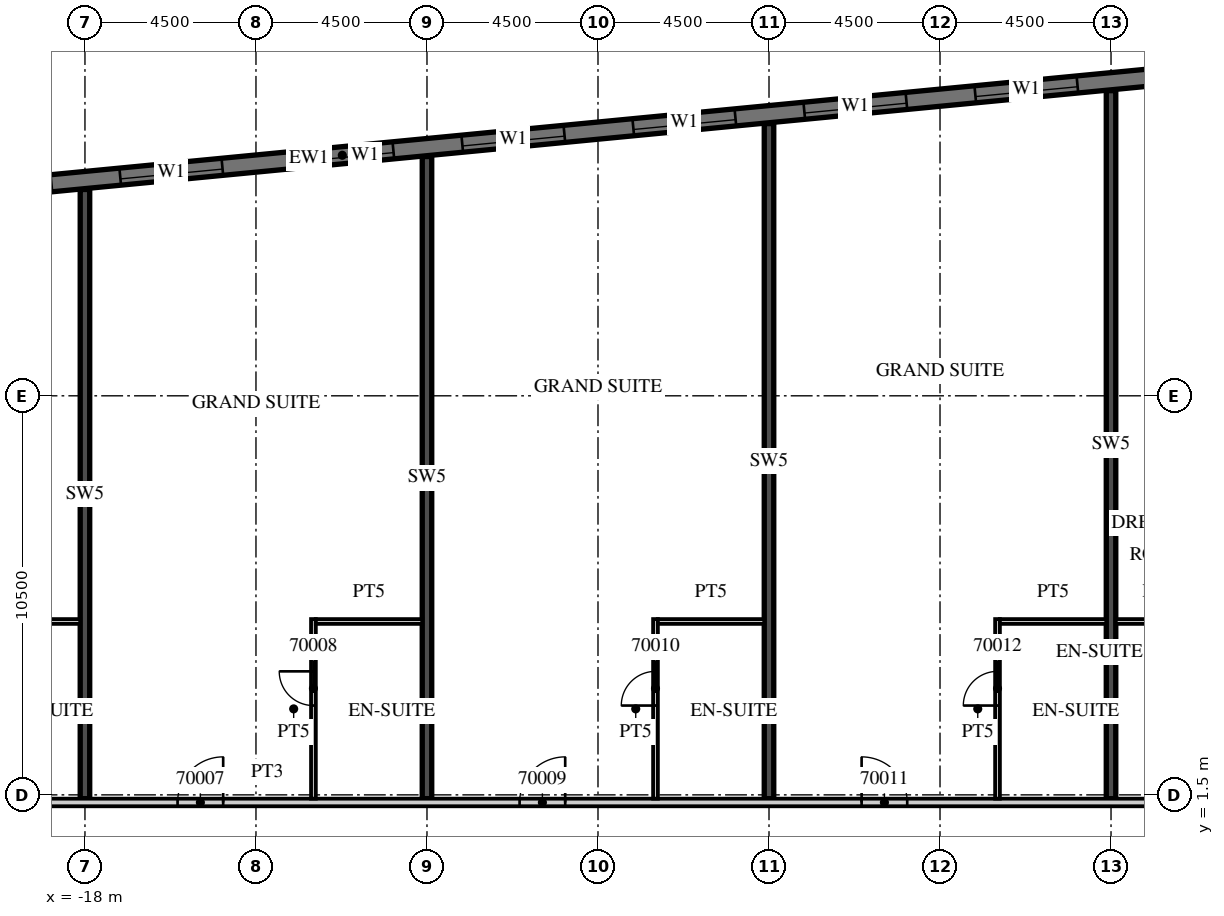
"""IFC4 building model, lengths in metres.
Left out: names, types, materials, properties, quantities, classifications, styles, units other than length and angle.
Written with IfcOpenShell. Run it as: python <this file> out.ifc"""

import sys

from ifc_helpers import new_model, si_unit, direction, frame, frame_2d, origin, place, context, subcontext, project, spatial, rectangle, extrude, element, fill, save


model = new_model("IFC4")
c1 = context("Model", 3, precision=1e-05, world=origin(), true_north=direction((0.0, 1.0)))
c2 = subcontext(c1, "Body", "Model", "MODEL_VIEW")
j1 = project(units=[si_unit("LENGTHUNIT", "METRE"), si_unit("PLANEANGLEUNIT", "RADIAN")], contexts=[c1])
p1 = place(None, origin())
s1 = spatial("IfcSite", under=j1, at=p1, CompositionType="ELEMENT")
p2 = place(p1, origin())
s2 = spatial("IfcBuilding", under=s1, at=p2, CompositionType="ELEMENT")
p3 = place(p2, frame((0.0, 0.0, 281.7)))
s3 = spatial("IfcBuildingStorey", under=s2, at=p3, CompositionType="ELEMENT", Elevation=281.7)
p4 = place(p3, frame((-18.0, 1.4, 0.0), z_axis=(0.0, 0.0, 1.0), x_axis=(0.0, 1.0, 0.0)))
e1 = element("IfcWall", 1, at=p4, inside=s3, PredefinedType="SHEAR", context=c2, shape_type="SweptSolid", body=[
    extrude(rectangle(XDim=16.03, YDim=0.25, at=frame_2d((8.015, 0.0))), origin(), (0.0, 0.0, 1.0), 3.3),
])
p5 = place(p3, frame((-9.0, 1.4, 0.0), z_axis=(0.0, 0.0, 1.0), x_axis=(0.0, 1.0, 0.0)))
e2 = element("IfcWall", 2, at=p5, inside=s3, PredefinedType="SHEAR", context=c2, shape_type="SweptSolid", body=[
    extrude(rectangle(XDim=16.896, YDim=0.25, at=frame_2d((8.448, 0.0))), origin(), (0.0, 0.0, 1.0), 3.3),
])
p6 = place(p3, frame((0.0, 1.4, 0.0), z_axis=(0.0, 0.0, 1.0), x_axis=(0.0, 1.0, 0.0)))
e3 = element("IfcWall", 3, at=p6, inside=s3, PredefinedType="SHEAR", context=c2, shape_type="SweptSolid", body=[
    extrude(rectangle(XDim=17.763, YDim=0.25, at=frame_2d((8.881, 0.0))), origin(), (0.0, 0.0, 1.0), 3.3),
])
p7 = place(p3, frame((9.0, 1.4, 0.0), z_axis=(0.0, 0.0, 1.0), x_axis=(0.0, 1.0, 0.0)))
e4 = element("IfcWall", 4, at=p7, inside=s3, PredefinedType="SHEAR", context=c2, shape_type="SweptSolid", body=[
    extrude(rectangle(XDim=18.629, YDim=0.25, at=frame_2d((9.315, 0.0))), origin(), (0.0, 0.0, 1.0), 3.3),
])
p8 = place(p3, frame((13.521, 20.713, 0.0), z_axis=(0.0, 0.0, 1.0), x_axis=(-0.995396277313, -0.095844932638, 0.0)))
e5 = element("IfcWall", 5, at=p8, inside=s3, PredefinedType="SOLIDWALL", context=c2, shape_type="SweptSolid", body=[
    extrude(rectangle(XDim=51.495, YDim=0.45, at=frame_2d((25.748, 0.0))), origin(), (0.0, 0.0, 1.0), 3.02),
])
p9 = place(p8, frame((0.91, 0.0, 0.45)))
e6 = element("IfcOpeningElement", 6, at=p9, cuts=e5, PredefinedType="OPENING", context=c2, shape_type="SweptSolid", body=[
    extrude(rectangle(XDim=2.7, YDim=2.25, at=frame_2d((1.35, 1.125))), frame((0.0, 0.235, 0.0), z_axis=(0.0, -1.0, 0.0), x_axis=(1.0, 0.0, 0.0)), (0.0, 0.0, 1.0), 0.47),
])
p10 = place(p8, frame((5.431, 0.0, 0.45)))
e7 = element("IfcOpeningElement", 7, at=p10, cuts=e5, PredefinedType="OPENING", context=c2, shape_type="SweptSolid", body=[
    extrude(rectangle(XDim=2.7, YDim=2.25, at=frame_2d((1.35, 1.125))), frame((0.0, 0.235, 0.0), z_axis=(0.0, -1.0, 0.0), x_axis=(1.0, 0.0, 0.0)), (0.0, 0.0, 1.0), 0.47),
])
p11 = place(p8, frame((9.952, 0.0, 0.45)))
e8 = element("IfcOpeningElement", 8, at=p11, cuts=e5, PredefinedType="OPENING", context=c2, shape_type="SweptSolid", body=[
    extrude(rectangle(XDim=2.7, YDim=2.25, at=frame_2d((1.35, 1.125))), frame((0.0, 0.235, 0.0), z_axis=(0.0, -1.0, 0.0), x_axis=(1.0, 0.0, 0.0)), (0.0, 0.0, 1.0), 0.47),
])
p12 = place(p8, frame((14.473, 0.0, 0.45)))
e9 = element("IfcOpeningElement", 9, at=p12, cuts=e5, PredefinedType="OPENING", context=c2, shape_type="SweptSolid", body=[
    extrude(rectangle(XDim=2.7, YDim=2.25, at=frame_2d((1.35, 1.125))), frame((0.0, 0.235, 0.0), z_axis=(0.0, -1.0, 0.0), x_axis=(1.0, 0.0, 0.0)), (0.0, 0.0, 1.0), 0.47),
])
p13 = place(p8, frame((18.994, 0.0, 0.45)))
e10 = element("IfcOpeningElement", 10, at=p13, cuts=e5, PredefinedType="OPENING", context=c2, shape_type="SweptSolid", body=[
    extrude(rectangle(XDim=2.7, YDim=2.25, at=frame_2d((1.35, 1.125))), frame((0.0, 0.235, 0.0), z_axis=(0.0, -1.0, 0.0), x_axis=(1.0, 0.0, 0.0)), (0.0, 0.0, 1.0), 0.47),
])
p14 = place(p8, frame((23.514, 0.0, 0.45)))
e11 = element("IfcOpeningElement", 11, at=p14, cuts=e5, PredefinedType="OPENING", context=c2, shape_type="SweptSolid", body=[
    extrude(rectangle(XDim=2.7, YDim=2.25, at=frame_2d((1.35, 1.125))), frame((0.0, 0.235, 0.0), z_axis=(0.0, -1.0, 0.0), x_axis=(1.0, 0.0, 0.0)), (0.0, 0.0, 1.0), 0.47),
])
p15 = place(p8, frame((28.035, 0.0, 0.45)))
e12 = element("IfcOpeningElement", 12, at=p15, cuts=e5, PredefinedType="OPENING", context=c2, shape_type="SweptSolid", body=[
    extrude(rectangle(XDim=2.7, YDim=2.25, at=frame_2d((1.35, 1.125))), frame((0.0, 0.235, 0.0), z_axis=(0.0, -1.0, 0.0), x_axis=(1.0, 0.0, 0.0)), (0.0, 0.0, 1.0), 0.47),
])
p16 = place(p8, frame((32.556, 0.0, 0.45)))
e13 = element("IfcOpeningElement", 13, at=p16, cuts=e5, PredefinedType="OPENING", context=c2, shape_type="SweptSolid", body=[
    extrude(rectangle(XDim=2.7, YDim=2.25, at=frame_2d((1.35, 1.125))), frame((0.0, 0.235, 0.0), z_axis=(0.0, -1.0, 0.0), x_axis=(1.0, 0.0, 0.0)), (0.0, 0.0, 1.0), 0.47),
])
p17 = place(p8, frame((37.077, 0.0, 0.45)))
e14 = element("IfcOpeningElement", 14, at=p17, cuts=e5, PredefinedType="OPENING", context=c2, shape_type="SweptSolid", body=[
    extrude(rectangle(XDim=2.7, YDim=2.25, at=frame_2d((1.35, 1.125))), frame((0.0, 0.235, 0.0), z_axis=(0.0, -1.0, 0.0), x_axis=(1.0, 0.0, 0.0)), (0.0, 0.0, 1.0), 0.47),
])
p18 = place(p8, frame((41.598, 0.0, 0.45)))
e15 = element("IfcOpeningElement", 15, at=p18, cuts=e5, PredefinedType="OPENING", context=c2, shape_type="SweptSolid", body=[
    extrude(rectangle(XDim=2.7, YDim=2.25, at=frame_2d((1.35, 1.125))), frame((0.0, 0.235, 0.0), z_axis=(0.0, -1.0, 0.0), x_axis=(1.0, 0.0, 0.0)), (0.0, 0.0, 1.0), 0.47),
])
p19 = place(p8, frame((46.118, 0.0, 0.45)))
e16 = element("IfcOpeningElement", 16, at=p19, cuts=e5, PredefinedType="OPENING", context=c2, shape_type="SweptSolid", body=[
    extrude(rectangle(XDim=2.7, YDim=2.25, at=frame_2d((1.35, 1.125))), frame((0.0, 0.235, 0.0), z_axis=(0.0, -1.0, 0.0), x_axis=(1.0, 0.0, 0.0)), (0.0, 0.0, 1.0), 0.47),
])
p20 = place(p3, frame((-39.909, 1.3, 0.0), z_axis=(0.0, 0.0, 1.0), x_axis=(1.0, 0.0, 0.0)))
e17 = element("IfcWall", 17, at=p20, inside=s3, PredefinedType="PARTITIONING", context=c2, shape_type="SweptSolid", body=[
    extrude(rectangle(XDim=53.409, YDim=0.2, at=frame_2d((26.705, 0.0))), origin(), (0.0, 0.0, 1.0), 3.02),
])
p21 = place(p20, frame((0.15, 0.0, 0.0)))
e18 = element("IfcOpeningElement", 18, at=p21, cuts=e17, PredefinedType="OPENING", context=c2, shape_type="SweptSolid", body=[
    extrude(rectangle(XDim=0.9, YDim=2.1, at=frame_2d((0.45, 1.05))), frame((0.0, 0.11, 0.0), z_axis=(0.0, -1.0, 0.0), x_axis=(1.0, 0.0, 0.0)), (0.0, 0.0, 1.0), 0.22),
])
p22 = place(p20, frame((6.347, 0.0, 0.0)))
e19 = element("IfcOpeningElement", 19, at=p22, cuts=e17, PredefinedType="OPENING", context=c2, shape_type="SweptSolid", body=[
    extrude(rectangle(XDim=1.2, YDim=2.1, at=frame_2d((0.6, 1.05))), frame((0.0, 0.11, 0.0), z_axis=(0.0, -1.0, 0.0), x_axis=(1.0, 0.0, 0.0)), (0.0, 0.0, 1.0), 0.22),
])
p23 = place(p20, frame((15.347, 0.0, 0.0)))
e20 = element("IfcOpeningElement", 20, at=p23, cuts=e17, PredefinedType="OPENING", context=c2, shape_type="SweptSolid", body=[
    extrude(rectangle(XDim=1.2, YDim=2.1, at=frame_2d((0.6, 1.05))), frame((0.0, 0.11, 0.0), z_axis=(0.0, -1.0, 0.0), x_axis=(1.0, 0.0, 0.0)), (0.0, 0.0, 1.0), 0.22),
])
p24 = place(p20, frame((24.346, 0.0, 0.0)))
e21 = element("IfcOpeningElement", 21, at=p24, cuts=e17, PredefinedType="OPENING", context=c2, shape_type="SweptSolid", body=[
    extrude(rectangle(XDim=1.2, YDim=2.1, at=frame_2d((0.6, 1.05))), frame((0.0, 0.11, 0.0), z_axis=(0.0, -1.0, 0.0), x_axis=(1.0, 0.0, 0.0)), (0.0, 0.0, 1.0), 0.22),
])
p25 = place(p20, frame((33.346, 0.0, 0.0)))
e22 = element("IfcOpeningElement", 22, at=p25, cuts=e17, PredefinedType="OPENING", context=c2, shape_type="SweptSolid", body=[
    extrude(rectangle(XDim=1.2, YDim=2.1, at=frame_2d((0.6, 1.05))), frame((0.0, 0.11, 0.0), z_axis=(0.0, -1.0, 0.0), x_axis=(1.0, 0.0, 0.0)), (0.0, 0.0, 1.0), 0.22),
])
p26 = place(p20, frame((42.346, 0.0, 0.0)))
e23 = element("IfcOpeningElement", 23, at=p26, cuts=e17, PredefinedType="OPENING", context=c2, shape_type="SweptSolid", body=[
    extrude(rectangle(XDim=1.2, YDim=2.1, at=frame_2d((0.6, 1.05))), frame((0.0, 0.11, 0.0), z_axis=(0.0, -1.0, 0.0), x_axis=(1.0, 0.0, 0.0)), (0.0, 0.0, 1.0), 0.22),
])
p27 = place(p20, frame((51.834, 0.0, 0.0)))
e24 = element("IfcOpeningElement", 24, at=p27, cuts=e17, PredefinedType="OPENING", context=c2, shape_type="SweptSolid", body=[
    extrude(rectangle(XDim=1.0, YDim=2.1, at=frame_2d((0.5, 1.05))), frame((0.0, 0.11, 0.0), z_axis=(0.0, -1.0, 0.0), x_axis=(1.0, 0.0, 0.0)), (0.0, 0.0, 1.0), 0.22),
])
p28 = place(p3, frame((-20.925, 6.062, 0.0), z_axis=(0.0, 0.0, 1.0), x_axis=(1.0, 0.0, 0.0)))
e25 = element("IfcWall", 25, at=p28, inside=s3, PredefinedType="PARTITIONING", context=c2, shape_type="SweptSolid", body=[
    extrude(rectangle(XDim=2.8, YDim=0.125, at=frame_2d((1.4, 0.0))), origin(), (0.0, 0.0, 1.0), 3.02),
])
p29 = place(p3, frame((-11.988, 1.4, 0.0), z_axis=(0.0, 0.0, 1.0), x_axis=(0.0, 1.0, 0.0)))
e26 = element("IfcWall", 26, at=p29, inside=s3, PredefinedType="PARTITIONING", context=c2, shape_type="SweptSolid", body=[
    extrude(rectangle(XDim=4.725, YDim=0.125, at=frame_2d((2.363, 0.0))), origin(), (0.0, 0.0, 1.0), 3.02),
])
p30 = place(p29, frame((2.45, 0.0, 0.0)))
e27 = element("IfcOpeningElement", 27, at=p30, cuts=e26, PredefinedType="OPENING", context=c2, shape_type="SweptSolid", body=[
    extrude(rectangle(XDim=0.9, YDim=2.1, at=frame_2d((0.45, 1.05))), frame((0.0, 0.073, 0.0), z_axis=(0.0, -1.0, 0.0), x_axis=(1.0, 0.0, 0.0)), (0.0, 0.0, 1.0), 0.145),
])
p31 = place(p3, frame((-11.925, 6.062, 0.0), z_axis=(0.0, 0.0, 1.0), x_axis=(1.0, 0.0, 0.0)))
e28 = element("IfcWall", 28, at=p31, inside=s3, PredefinedType="PARTITIONING", context=c2, shape_type="SweptSolid", body=[
    extrude(rectangle(XDim=2.8, YDim=0.125, at=frame_2d((1.4, 0.0))), origin(), (0.0, 0.0, 1.0), 3.02),
])
p32 = place(p3, frame((-2.987, 1.4, 0.0), z_axis=(0.0, 0.0, 1.0), x_axis=(0.0, 1.0, 0.0)))
e29 = element("IfcWall", 29, at=p32, inside=s3, PredefinedType="PARTITIONING", context=c2, shape_type="SweptSolid", body=[
    extrude(rectangle(XDim=4.725, YDim=0.125, at=frame_2d((2.363, 0.0))), origin(), (0.0, 0.0, 1.0), 3.02),
])
p33 = place(p32, frame((2.45, 0.0, 0.0)))
e30 = element("IfcOpeningElement", 30, at=p33, cuts=e29, PredefinedType="OPENING", context=c2, shape_type="SweptSolid", body=[
    extrude(rectangle(XDim=0.9, YDim=2.1, at=frame_2d((0.45, 1.05))), frame((0.0, 0.073, 0.0), z_axis=(0.0, -1.0, 0.0), x_axis=(1.0, 0.0, 0.0)), (0.0, 0.0, 1.0), 0.145),
])
p34 = place(p3, frame((-2.925, 6.062, 0.0), z_axis=(0.0, 0.0, 1.0), x_axis=(1.0, 0.0, 0.0)))
e31 = element("IfcWall", 31, at=p34, inside=s3, PredefinedType="PARTITIONING", context=c2, shape_type="SweptSolid", body=[
    extrude(rectangle(XDim=2.8, YDim=0.125, at=frame_2d((1.4, 0.0))), origin(), (0.0, 0.0, 1.0), 3.02),
])
p35 = place(p3, frame((6.013, 1.4, 0.0), z_axis=(0.0, 0.0, 1.0), x_axis=(0.0, 1.0, 0.0)))
e32 = element("IfcWall", 32, at=p35, inside=s3, PredefinedType="PARTITIONING", context=c2, shape_type="SweptSolid", body=[
    extrude(rectangle(XDim=4.725, YDim=0.125, at=frame_2d((2.363, 0.0))), origin(), (0.0, 0.0, 1.0), 3.02),
])
p36 = place(p35, frame((2.45, 0.0, 0.0)))
e33 = element("IfcOpeningElement", 33, at=p36, cuts=e32, PredefinedType="OPENING", context=c2, shape_type="SweptSolid", body=[
    extrude(rectangle(XDim=0.9, YDim=2.1, at=frame_2d((0.45, 1.05))), frame((0.0, 0.073, 0.0), z_axis=(0.0, -1.0, 0.0), x_axis=(1.0, 0.0, 0.0)), (0.0, 0.0, 1.0), 0.145),
])
p37 = place(p3, frame((6.075, 6.062, 0.0), z_axis=(0.0, 0.0, 1.0), x_axis=(1.0, 0.0, 0.0)))
e34 = element("IfcWall", 34, at=p37, inside=s3, PredefinedType="PARTITIONING", context=c2, shape_type="SweptSolid", body=[
    extrude(rectangle(XDim=2.8, YDim=0.125, at=frame_2d((1.4, 0.0))), origin(), (0.0, 0.0, 1.0), 3.02),
])
p38 = place(p3, frame((9.125, 6.062, 0.0), z_axis=(0.0, 0.0, 1.0), x_axis=(1.0, 0.0, 0.0)))
e35 = element("IfcWall", 35, at=p38, inside=s3, PredefinedType="PARTITIONING", context=c2, shape_type="SweptSolid", body=[
    extrude(rectangle(XDim=2.25, YDim=0.125, at=frame_2d((1.125, 0.0))), origin(), (0.0, 0.0, 1.0), 3.02),
])
p39 = place(p10, origin())
e36 = element("IfcWindow", 36, at=p39, inside=s3, PartitioningType="SINGLE_PANEL", PredefinedType="WINDOW", context=c2, shape_type="SweptSolid", body=[
    extrude(rectangle(XDim=2.7, YDim=2.25, at=frame_2d((1.35, 1.125))), frame((0.0, 0.09, 0.0), z_axis=(0.0, -1.0, 0.0), x_axis=(1.0, 0.0, 0.0)), (0.0, 0.0, 1.0), 0.06),
])
fill(e7, e36)
p40 = place(p11, origin())
e37 = element("IfcWindow", 37, at=p40, inside=s3, PartitioningType="SINGLE_PANEL", PredefinedType="WINDOW", context=c2, shape_type="SweptSolid", body=[
    extrude(rectangle(XDim=2.7, YDim=2.25, at=frame_2d((1.35, 1.125))), frame((0.0, 0.09, 0.0), z_axis=(0.0, -1.0, 0.0), x_axis=(1.0, 0.0, 0.0)), (0.0, 0.0, 1.0), 0.06),
])
fill(e8, e37)
p41 = place(p12, origin())
e38 = element("IfcWindow", 38, at=p41, inside=s3, PartitioningType="SINGLE_PANEL", PredefinedType="WINDOW", context=c2, shape_type="SweptSolid", body=[
    extrude(rectangle(XDim=2.7, YDim=2.25, at=frame_2d((1.35, 1.125))), frame((0.0, 0.09, 0.0), z_axis=(0.0, -1.0, 0.0), x_axis=(1.0, 0.0, 0.0)), (0.0, 0.0, 1.0), 0.06),
])
fill(e9, e38)
p42 = place(p13, origin())
e39 = element("IfcWindow", 39, at=p42, inside=s3, PartitioningType="SINGLE_PANEL", PredefinedType="WINDOW", context=c2, shape_type="SweptSolid", body=[
    extrude(rectangle(XDim=2.7, YDim=2.25, at=frame_2d((1.35, 1.125))), frame((0.0, 0.09, 0.0), z_axis=(0.0, -1.0, 0.0), x_axis=(1.0, 0.0, 0.0)), (0.0, 0.0, 1.0), 0.06),
])
fill(e10, e39)
p43 = place(p14, origin())
e40 = element("IfcWindow", 40, at=p43, inside=s3, PartitioningType="SINGLE_PANEL", PredefinedType="WINDOW", context=c2, shape_type="SweptSolid", body=[
    extrude(rectangle(XDim=2.7, YDim=2.25, at=frame_2d((1.35, 1.125))), frame((0.0, 0.09, 0.0), z_axis=(0.0, -1.0, 0.0), x_axis=(1.0, 0.0, 0.0)), (0.0, 0.0, 1.0), 0.06),
])
fill(e11, e40)
p44 = place(p15, origin())
e41 = element("IfcWindow", 41, at=p44, inside=s3, PartitioningType="SINGLE_PANEL", PredefinedType="WINDOW", context=c2, shape_type="SweptSolid", body=[
    extrude(rectangle(XDim=2.7, YDim=2.25, at=frame_2d((1.35, 1.125))), frame((0.0, 0.09, 0.0), z_axis=(0.0, -1.0, 0.0), x_axis=(1.0, 0.0, 0.0)), (0.0, 0.0, 1.0), 0.06),
])
fill(e12, e41)
p45 = place(p24, origin())
e42 = element("IfcDoor", 42, at=p45, inside=s3, OperationType="SINGLE_SWING_RIGHT", PredefinedType="DOOR", context=c2, shape_type="SweptSolid", body=[
    extrude(rectangle(XDim=1.2, YDim=2.1, at=frame_2d((0.6, 1.05))), frame((0.0, 0.025, 0.0), z_axis=(0.0, -1.0, 0.0), x_axis=(1.0, 0.0, 0.0)), (0.0, 0.0, 1.0), 0.05),
])
fill(e21, e42)
p46 = place(p30, origin())
e43 = element("IfcDoor", 43, at=p46, inside=s3, OperationType="SINGLE_SWING_RIGHT", PredefinedType="DOOR", context=c2, shape_type="SweptSolid", body=[
    extrude(rectangle(XDim=0.9, YDim=2.1, at=frame_2d((0.45, 1.05))), frame((0.0, 0.025, 0.0), z_axis=(0.0, -1.0, 0.0), x_axis=(1.0, 0.0, 0.0)), (0.0, 0.0, 1.0), 0.05),
])
fill(e27, e43)
p47 = place(p25, origin())
e44 = element("IfcDoor", 44, at=p47, inside=s3, OperationType="SINGLE_SWING_RIGHT", PredefinedType="DOOR", context=c2, shape_type="SweptSolid", body=[
    extrude(rectangle(XDim=1.2, YDim=2.1, at=frame_2d((0.6, 1.05))), frame((0.0, 0.025, 0.0), z_axis=(0.0, -1.0, 0.0), x_axis=(1.0, 0.0, 0.0)), (0.0, 0.0, 1.0), 0.05),
])
fill(e22, e44)
p48 = place(p33, origin())
e45 = element("IfcDoor", 45, at=p48, inside=s3, OperationType="SINGLE_SWING_LEFT", PredefinedType="DOOR", context=c2, shape_type="SweptSolid", body=[
    extrude(rectangle(XDim=0.9, YDim=2.1, at=frame_2d((0.45, 1.05))), frame((0.0, 0.025, 0.0), z_axis=(0.0, -1.0, 0.0), x_axis=(1.0, 0.0, 0.0)), (0.0, 0.0, 1.0), 0.05),
])
fill(e30, e45)
p49 = place(p26, origin())
e46 = element("IfcDoor", 46, at=p49, inside=s3, OperationType="SINGLE_SWING_LEFT", PredefinedType="DOOR", context=c2, shape_type="SweptSolid", body=[
    extrude(rectangle(XDim=1.2, YDim=2.1, at=frame_2d((0.6, 1.05))), frame((0.0, 0.025, 0.0), z_axis=(0.0, -1.0, 0.0), x_axis=(1.0, 0.0, 0.0)), (0.0, 0.0, 1.0), 0.05),
])
fill(e23, e46)
p50 = place(p36, origin())
e47 = element("IfcDoor", 47, at=p50, inside=s3, OperationType="SINGLE_SWING_LEFT", PredefinedType="DOOR", context=c2, shape_type="SweptSolid", body=[
    extrude(rectangle(XDim=0.9, YDim=2.1, at=frame_2d((0.45, 1.05))), frame((0.0, 0.025, 0.0), z_axis=(0.0, -1.0, 0.0), x_axis=(1.0, 0.0, 0.0)), (0.0, 0.0, 1.0), 0.05),
])
fill(e33, e47)
save(model, sys.argv[1])
